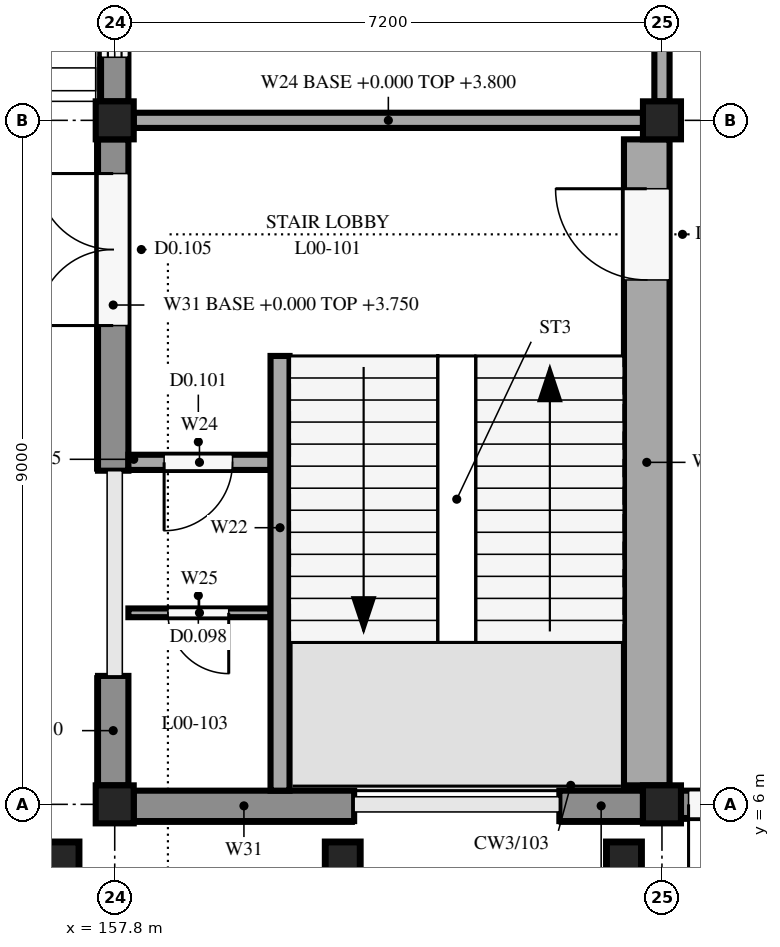
"""IFC4 building model, lengths in metres.
Left out: names, types, materials, properties, quantities, classifications, styles, units other than length and angle.
Written with IfcOpenShell. Run it as: python <this file> out.ifc"""

import sys

from ifc_helpers import new_model, si_unit, direction, frame, frame_2d, origin, origin_2d, place, context, subcontext, project, spatial, rectangle, extrude, element, fill, save


model = new_model("IFC4")
c1 = context("Model", 3, precision=1e-05, world=origin(), true_north=direction((0.0, 1.0)))
c2 = subcontext(c1, "Body", "Model", "MODEL_VIEW")
j1 = project(units=[si_unit("LENGTHUNIT", "METRE"), si_unit("PLANEANGLEUNIT", "RADIAN")], contexts=[c1])
p1 = place(None, origin())
s1 = spatial("IfcSite", under=j1, at=p1, CompositionType="ELEMENT")
p2 = place(p1, origin())
s2 = spatial("IfcBuilding", under=s1, at=p2, CompositionType="ELEMENT")
p3 = place(p2, origin())
s3 = spatial("IfcBuildingStorey", under=s2, at=p3, CompositionType="ELEMENT", Elevation=0.0)
for number, where, z_axis, x_axis in (
    (1, (157.8, 6.0, 0.0), (0.0, 0.0, 1.0), (1.0, 0.0, 0.0)),
    (2, (157.8, 15.0, 0.0), (0.0, 0.0, 1.0), (1.0, 0.0, 0.0)),
    (3, (165.0, 6.0, 0.0), (0.0, 0.0, 1.0), (1.0, 0.0, 0.0)),
    (4, (165.0, 15.0, 0.0), (0.0, 0.0, 1.0), (1.0, 0.0, 0.0)),
):
    element("IfcColumn", number, at=place(p3, frame(where, z_axis=z_axis, x_axis=x_axis)), inside=s3, PredefinedType="COLUMN", context=c2, shape_type="SweptSolid", body=[
        extrude(rectangle(XDim=0.5, YDim=0.5, at=origin_2d()), origin(), (0.0, 0.0, 1.0), 4.25),
    ])
for number, where, z_axis, x_axis in (
    (5, (157.1, 5.275, -0.3), (0.0, 0.0, 1.0), (1.0, 0.0, 0.0)),
    (6, (160.8, 5.275, -0.3), (0.0, 0.0, 1.0), (1.0, 0.0, 0.0)),
    (7, (164.5, 5.275, -0.3), (0.0, 0.0, 1.0), (1.0, 0.0, 0.0)),
):
    element("IfcColumn", number, at=place(p3, frame(where, z_axis=z_axis, x_axis=x_axis)), inside=s3, PredefinedType="COLUMN", context=c2, shape_type="SweptSolid", body=[
        extrude(rectangle(XDim=0.45, YDim=0.45, at=origin_2d()), origin(), (0.0, 0.0, 1.0), 3.95),
    ])
p4 = place(p3, frame((157.78, 6.25, 0.0), z_axis=(0.0, 0.0, 1.0), x_axis=(0.0, 1.0, 0.0)))
e8 = element("IfcWall", 8, at=p4, inside=s3, PredefinedType="STANDARD", context=c2, shape_type="SweptSolid", body=[
    extrude(rectangle(XDim=1.44, YDim=0.4, at=frame_2d((0.72, 0.0))), origin(), (0.0, 0.0, 1.0), 3.75),
])
p5 = place(p3, frame((157.78, 10.39, 0.0), z_axis=(0.0, 0.0, 1.0), x_axis=(0.0, 1.0, 0.0)))
e9 = element("IfcWall", 9, at=p5, inside=s3, PredefinedType="STANDARD", context=c2, shape_type="SweptSolid", body=[
    extrude(rectangle(XDim=4.36, YDim=0.4, at=frame_2d((2.18, 0.0))), origin(), (0.0, 0.0, 1.0), 3.75),
])
p6 = place(p5, frame((1.91, 0.0, 0.0)))
e10 = element("IfcOpeningElement", 10, at=p6, cuts=e9, PredefinedType="OPENING", context=c2, shape_type="SweptSolid", body=[
    extrude(rectangle(XDim=2.0, YDim=2.2, at=frame_2d((1.0, 1.1))), frame((0.0, 0.21, 0.0), z_axis=(0.0, -1.0, 0.0), x_axis=(1.0, 0.0, 0.0)), (0.0, 0.0, 1.0), 0.42),
])
p7 = place(p3, frame((157.8, 15.25, 0.0), z_axis=(0.0, 0.0, 1.0), x_axis=(0.0, 1.0, 0.0)))
e11 = element("IfcWall", 11, at=p7, inside=s3, PredefinedType="STANDARD", context=c2, shape_type="SweptSolid", body=[
    extrude(rectangle(XDim=8.5, YDim=0.36, at=frame_2d((4.25, 0.0))), origin(), (0.0, 0.0, 1.0), 3.75),
])
p8 = place(p7, frame((0.58, 0.0, 0.6)))
e12 = element("IfcOpeningElement", 12, at=p8, cuts=e11, PredefinedType="OPENING", context=c2, shape_type="SweptSolid", body=[
    extrude(rectangle(XDim=1.4, YDim=3.0, at=frame_2d((0.7, 1.5))), frame((0.0, 0.19, 0.0), z_axis=(0.0, -1.0, 0.0), x_axis=(1.0, 0.0, 0.0)), (0.0, 0.0, 1.0), 0.38),
])
p9 = place(p7, frame((2.56, 0.0, 0.6)))
e13 = element("IfcOpeningElement", 13, at=p9, cuts=e11, PredefinedType="OPENING", context=c2, shape_type="SweptSolid", body=[
    extrude(rectangle(XDim=1.4, YDim=3.0, at=frame_2d((0.7, 1.5))), frame((0.0, 0.19, 0.0), z_axis=(0.0, -1.0, 0.0), x_axis=(1.0, 0.0, 0.0)), (0.0, 0.0, 1.0), 0.38),
])
p10 = place(p7, frame((4.54, 0.0, 0.6)))
e14 = element("IfcOpeningElement", 14, at=p10, cuts=e11, PredefinedType="OPENING", context=c2, shape_type="SweptSolid", body=[
    extrude(rectangle(XDim=1.4, YDim=3.0, at=frame_2d((0.7, 1.5))), frame((0.0, 0.19, 0.0), z_axis=(0.0, -1.0, 0.0), x_axis=(1.0, 0.0, 0.0)), (0.0, 0.0, 1.0), 0.38),
])
p11 = place(p7, frame((6.52, 0.0, 0.6)))
e15 = element("IfcOpeningElement", 15, at=p11, cuts=e11, PredefinedType="OPENING", context=c2, shape_type="SweptSolid", body=[
    extrude(rectangle(XDim=1.4, YDim=3.0, at=frame_2d((0.7, 1.5))), frame((0.0, 0.19, 0.0), z_axis=(0.0, -1.0, 0.0), x_axis=(1.0, 0.0, 0.0)), (0.0, 0.0, 1.0), 0.38),
])
p12 = place(p3, frame((160.95, 5.98, 0.0), z_axis=(0.0, 0.0, 1.0), x_axis=(-1.0, 0.0, 0.0)))
e16 = element("IfcWall", 16, at=p12, inside=s3, PredefinedType="STANDARD", context=c2, shape_type="SweptSolid", body=[
    extrude(rectangle(XDim=2.9, YDim=0.4, at=frame_2d((1.45, 0.0))), origin(), (0.0, 0.0, 1.0), 3.8),
])
p13 = place(p3, frame((164.75, 5.98, 0.0), z_axis=(0.0, 0.0, 1.0), x_axis=(-1.0, 0.0, 0.0)))
e17 = element("IfcWall", 17, at=p13, inside=s3, PredefinedType="STANDARD", context=c2, shape_type="SweptSolid", body=[
    extrude(rectangle(XDim=1.1, YDim=0.4, at=frame_2d((0.55, 0.0))), origin(), (0.0, 0.0, 1.0), 3.8),
])
p14 = place(p3, frame((167.45, 6.0, 0.0), z_axis=(0.0, 0.0, 1.0), x_axis=(-1.0, 0.0, 0.0)))
e18 = element("IfcWall", 18, at=p14, inside=s3, PredefinedType="STANDARD", context=c2, shape_type="SweptSolid", body=[
    extrude(rectangle(XDim=2.2, YDim=0.36, at=frame_2d((1.1, 0.0))), origin(), (0.0, 0.0, 1.0), 3.9),
])
p15 = place(p14, frame((0.1, 0.0, 0.0)))
e19 = element("IfcOpeningElement", 19, at=p15, cuts=e18, PredefinedType="OPENING", context=c2, shape_type="SweptSolid", body=[
    extrude(rectangle(XDim=2.0, YDim=2.4, at=frame_2d((1.0, 1.2))), frame((0.0, 0.19, 0.0), z_axis=(0.0, -1.0, 0.0), x_axis=(1.0, 0.0, 0.0)), (0.0, 0.0, 1.0), 0.38),
])
p16 = place(p3, frame((159.975, 6.18, 0.0), z_axis=(0.0, 0.0, 1.0), x_axis=(0.0, 1.0, 0.0)))
e20 = element("IfcWall", 20, at=p16, inside=s3, PredefinedType="SOLIDWALL", context=c2, shape_type="SweptSolid", body=[
    extrude(rectangle(XDim=5.72, YDim=0.25, at=frame_2d((2.86, 0.0))), origin(), (0.0, 0.0, 1.0), 4.25),
])
p17 = place(p3, frame((164.8, 6.25, 0.0), z_axis=(0.0, 0.0, 1.0), x_axis=(0.0, 1.0, 0.0)))
e21 = element("IfcWall", 21, at=p17, inside=s3, PredefinedType="SOLIDWALL", context=c2, shape_type="SweptSolid", body=[
    extrude(rectangle(XDim=8.5, YDim=0.6, at=frame_2d((4.25, 0.0))), origin(), (0.0, 0.0, 1.0), 4.25),
])
p18 = place(p17, frame((6.65, 0.0, 0.0)))
e22 = element("IfcOpeningElement", 22, at=p18, cuts=e21, PredefinedType="OPENING", context=c2, shape_type="SweptSolid", body=[
    extrude(rectangle(XDim=1.2, YDim=2.1, at=frame_2d((0.6, 1.05))), frame((0.0, 0.31, 0.0), z_axis=(0.0, -1.0, 0.0), x_axis=(1.0, 0.0, 0.0)), (0.0, 0.0, 1.0), 0.62),
])
p19 = place(p3, frame((159.85, 10.5, 0.0), z_axis=(0.0, 0.0, 1.0), x_axis=(-1.0, 0.0, 0.0)))
e23 = element("IfcWall", 23, at=p19, inside=s3, PredefinedType="SOLIDWALL", context=c2, shape_type="SweptSolid", body=[
    extrude(rectangle(XDim=1.87, YDim=0.2, at=frame_2d((0.935, 0.0))), origin(), (0.0, 0.0, 1.0), 4.25),
])
p20 = place(p19, frame((0.5, 0.0, 0.0)))
e24 = element("IfcOpeningElement", 24, at=p20, cuts=e23, PredefinedType="OPENING", context=c2, shape_type="SweptSolid", body=[
    extrude(rectangle(XDim=0.9, YDim=2.1, at=frame_2d((0.45, 1.05))), frame((0.0, 0.11, 0.0), z_axis=(0.0, -1.0, 0.0), x_axis=(1.0, 0.0, 0.0)), (0.0, 0.0, 1.0), 0.22),
])
p21 = place(p3, frame((159.85, 8.52, 0.0), z_axis=(0.0, 0.0, 1.0), x_axis=(-1.0, 0.0, 0.0)))
e25 = element("IfcWall", 25, at=p21, inside=s3, PredefinedType="PARTITIONING", context=c2, shape_type="SweptSolid", body=[
    extrude(rectangle(XDim=1.87, YDim=0.115, at=frame_2d((0.935, 0.0))), origin(), (0.0, 0.0, 1.0), 4.25),
])
p22 = place(p21, frame((0.55, 0.0, 0.0)))
e26 = element("IfcOpeningElement", 26, at=p22, cuts=e25, PredefinedType="OPENING", context=c2, shape_type="SweptSolid", body=[
    extrude(rectangle(XDim=0.8, YDim=2.1, at=frame_2d((0.4, 1.05))), frame((0.0, 0.067, 0.0), z_axis=(0.0, -1.0, 0.0), x_axis=(1.0, 0.0, 0.0)), (0.0, 0.0, 1.0), 0.135),
])
p23 = place(p3, frame((158.05, 15.0, 0.0), z_axis=(0.0, 0.0, 1.0), x_axis=(1.0, 0.0, 0.0)))
e27 = element("IfcWall", 27, at=p23, inside=s3, PredefinedType="SOLIDWALL", context=c2, shape_type="SweptSolid", body=[
    extrude(rectangle(XDim=6.7, YDim=0.2, at=frame_2d((3.35, 0.0))), origin(), (0.0, 0.0, 1.0), 3.8),
])
p24 = place(p3, frame((165.0, 15.25, 0.0), z_axis=(0.0, 0.0, 1.0), x_axis=(0.0, 1.0, 0.0)))
e28 = element("IfcWall", 28, at=p24, inside=s3, PredefinedType="PARTITIONING", context=c2, shape_type="SweptSolid", body=[
    extrude(rectangle(XDim=8.5, YDim=0.2, at=frame_2d((4.25, 0.0))), origin(), (0.0, 0.0, 1.0), 3.8),
])
p25 = place(p24, frame((3.75, 0.0, 0.0)))
e29 = element("IfcOpeningElement", 29, at=p25, cuts=e28, PredefinedType="OPENING", context=c2, shape_type="SweptSolid", body=[
    extrude(rectangle(XDim=1.0, YDim=2.1, at=frame_2d((0.5, 1.05))), frame((0.0, 0.11, 0.0), z_axis=(0.0, -1.0, 0.0), x_axis=(1.0, 0.0, 0.0)), (0.0, 0.0, 1.0), 0.22),
])
p26 = place(p6, origin())
e30 = element("IfcDoor", 30, at=p26, inside=s3, OperationType="DOUBLE_DOOR_SINGLE_SWING", PredefinedType="DOOR", context=c2, shape_type="SweptSolid", body=[
    extrude(rectangle(XDim=2.0, YDim=2.2, at=frame_2d((1.0, 1.1))), frame((0.0, 0.025, 0.0), z_axis=(0.0, -1.0, 0.0), x_axis=(1.0, 0.0, 0.0)), (0.0, 0.0, 1.0), 0.05),
])
fill(e10, e30)
p27 = place(p8, origin())
e31 = element("IfcWindow", 31, at=p27, inside=s3, PartitioningType="DOUBLE_PANEL_VERTICAL", PredefinedType="WINDOW", context=c2, shape_type="SweptSolid", body=[
    extrude(rectangle(XDim=1.4, YDim=3.0, at=frame_2d((0.7, 1.5))), frame((0.0, 0.03, 0.0), z_axis=(0.0, -1.0, 0.0), x_axis=(1.0, 0.0, 0.0)), (0.0, 0.0, 1.0), 0.06),
])
fill(e12, e31)
p28 = place(p15, origin())
e32 = element("IfcDoor", 32, at=p28, inside=s3, OperationType="DOUBLE_DOOR_SINGLE_SWING", PredefinedType="DOOR", context=c2, shape_type="SweptSolid", body=[
    extrude(rectangle(XDim=2.0, YDim=2.4, at=frame_2d((1.0, 1.2))), frame((0.0, 0.025, 0.0), z_axis=(0.0, -1.0, 0.0), x_axis=(1.0, 0.0, 0.0)), (0.0, 0.0, 1.0), 0.05),
])
fill(e19, e32)
p29 = place(p18, origin())
e33 = element("IfcDoor", 33, at=p29, inside=s3, OperationType="SINGLE_SWING_RIGHT", PredefinedType="DOOR", context=c2, shape_type="SweptSolid", body=[
    extrude(rectangle(XDim=1.2, YDim=2.1, at=frame_2d((0.6, 1.05))), frame((0.0, 0.025, 0.0), z_axis=(0.0, -1.0, 0.0), x_axis=(1.0, 0.0, 0.0)), (0.0, 0.0, 1.0), 0.05),
])
fill(e22, e33)
p30 = place(p20, origin())
e34 = element("IfcDoor", 34, at=p30, inside=s3, OperationType="SINGLE_SWING_RIGHT", PredefinedType="DOOR", context=c2, shape_type="SweptSolid", body=[
    extrude(rectangle(XDim=0.9, YDim=2.1, at=frame_2d((0.45, 1.05))), frame((0.0, 0.025, 0.0), z_axis=(0.0, -1.0, 0.0), x_axis=(1.0, 0.0, 0.0)), (0.0, 0.0, 1.0), 0.05),
])
fill(e24, e34)
p31 = place(p22, origin())
e35 = element("IfcDoor", 35, at=p31, inside=s3, OperationType="SINGLE_SWING_LEFT", PredefinedType="DOOR", context=c2, shape_type="SweptSolid", body=[
    extrude(rectangle(XDim=0.8, YDim=2.1, at=frame_2d((0.4, 1.05))), frame((0.0, 0.025, 0.0), z_axis=(0.0, -1.0, 0.0), x_axis=(1.0, 0.0, 0.0)), (0.0, 0.0, 1.0), 0.05),
])
fill(e26, e35)
save(model, sys.argv[1])
